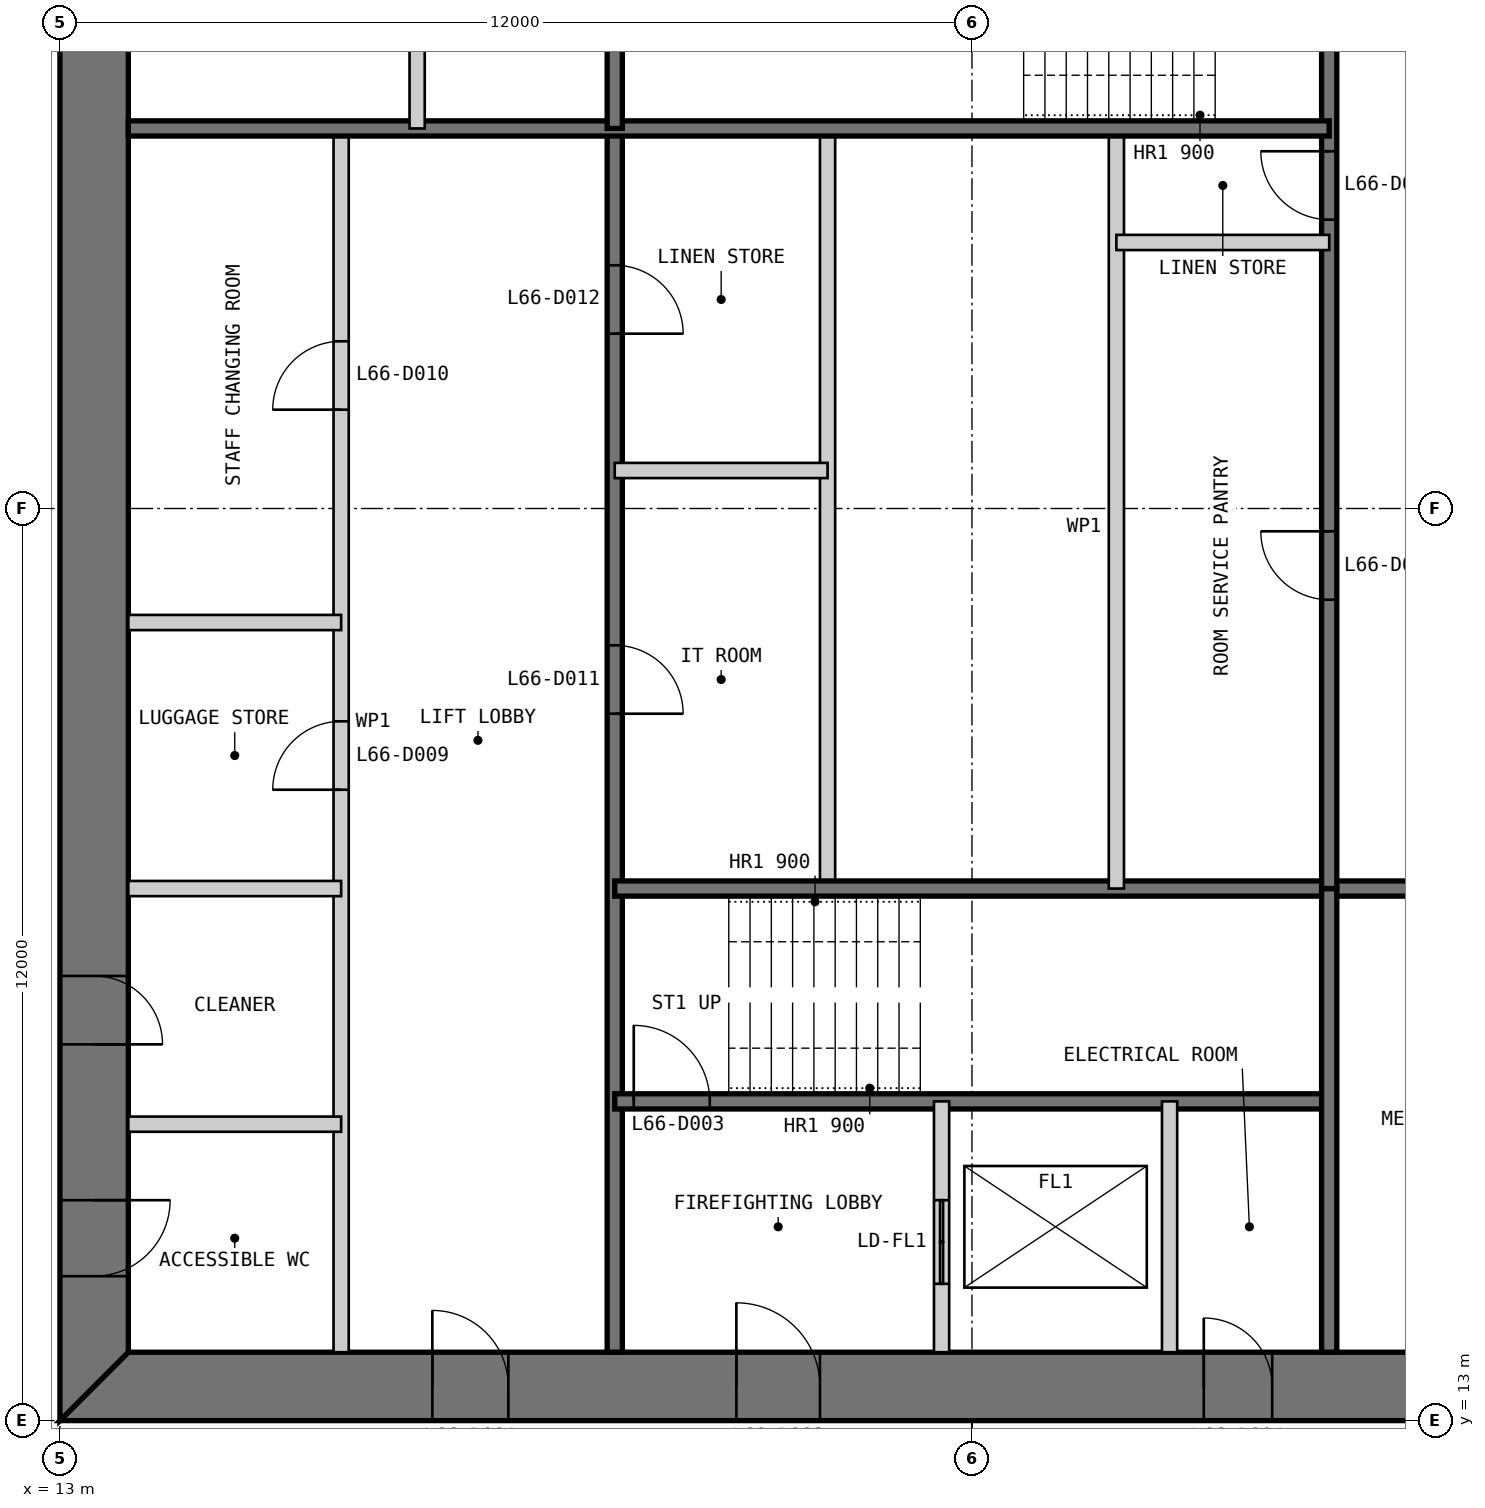
"""IFC4 building model, lengths in metres.
Left out: names, types, materials, properties, quantities, classifications, styles, units other than length and angle.
Written with IfcOpenShell. Run it as: python <this file> out.ifc"""

import sys

from ifc_helpers import new_model, si_unit, direction, frame, frame_2d, origin, place, context, subcontext, project, spatial, polyline, rectangle, outline, extrude, element, fill, save


model = new_model("IFC4")
c1 = context("Model", 3, precision=1e-05, world=origin(), true_north=direction((0.0, 1.0)))
c2 = subcontext(c1, "Body", "Model", "MODEL_VIEW")
j1 = project(units=[si_unit("LENGTHUNIT", "METRE"), si_unit("PLANEANGLEUNIT", "RADIAN")], contexts=[c1])
p1 = place(None, origin())
s1 = spatial("IfcSite", under=j1, at=p1, CompositionType="ELEMENT")
p2 = place(p1, origin())
s2 = spatial("IfcBuilding", under=s1, at=p2, CompositionType="ELEMENT")
p3 = place(p2, frame((0.0, 0.0, 276.4)))
s3 = spatial("IfcBuildingStorey", under=s2, at=p3, CompositionType="ELEMENT", Elevation=276.4)
p4 = place(p3, frame((13.0, 13.45, 0.0), z_axis=(0.0, 0.0, 1.0), x_axis=(1.0, 0.0, 0.0)))
e1 = element("IfcWall", 1, at=p4, inside=s3, PredefinedType="SHEAR", context=c2, shape_type="SweptSolid", body=[
    extrude(outline(polyline([(0.0, -0.45), (24.0, -0.45), (23.1, 0.45), (0.9, 0.45), (0.0, -0.45)])), origin(), (0.0, 0.0, 1.0), 3.4),
])
p5 = place(p4, frame((4.9, 0.0, 0.0)))
e2 = element("IfcOpeningElement", 2, at=p5, cuts=e1, PredefinedType="OPENING", context=c2, shape_type="SweptSolid", body=[
    extrude(rectangle(XDim=1.0, YDim=2.2, at=frame_2d((0.5, 1.1))), frame((0.0, 0.46, 0.0), z_axis=(0.0, -1.0, 0.0), x_axis=(1.0, 0.0, 0.0)), (0.0, 0.0, 1.0), 0.92),
])
p6 = place(p4, frame((8.9, 0.0, 0.0)))
e3 = element("IfcOpeningElement", 3, at=p6, cuts=e1, PredefinedType="OPENING", context=c2, shape_type="SweptSolid", body=[
    extrude(rectangle(XDim=1.1, YDim=2.2, at=frame_2d((0.55, 1.1))), frame((0.0, 0.46, 0.0), z_axis=(0.0, -1.0, 0.0), x_axis=(1.0, 0.0, 0.0)), (0.0, 0.0, 1.0), 0.92),
])
p7 = place(p4, frame((15.05, 0.0, 0.0)))
e4 = element("IfcOpeningElement", 4, at=p7, cuts=e1, PredefinedType="OPENING", context=c2, shape_type="SweptSolid", body=[
    extrude(rectangle(XDim=0.9, YDim=2.2, at=frame_2d((0.45, 1.1))), frame((0.0, 0.46, 0.0), z_axis=(0.0, -1.0, 0.0), x_axis=(1.0, 0.0, 0.0)), (0.0, 0.0, 1.0), 0.92),
])
p8 = place(p4, frame((17.9, 0.0, 0.0)))
e5 = element("IfcOpeningElement", 5, at=p8, cuts=e1, PredefinedType="OPENING", context=c2, shape_type="SweptSolid", body=[
    extrude(rectangle(XDim=1.0, YDim=2.2, at=frame_2d((0.5, 1.1))), frame((0.0, 0.46, 0.0), z_axis=(0.0, -1.0, 0.0), x_axis=(1.0, 0.0, 0.0)), (0.0, 0.0, 1.0), 0.92),
])
p9 = place(p4, frame((21.4, 0.0, 0.0)))
e6 = element("IfcOpeningElement", 6, at=p9, cuts=e1, PredefinedType="OPENING", context=c2, shape_type="SweptSolid", body=[
    extrude(rectangle(XDim=1.0, YDim=2.2, at=frame_2d((0.5, 1.1))), frame((0.0, 0.46, 0.0), z_axis=(0.0, -1.0, 0.0), x_axis=(1.0, 0.0, 0.0)), (0.0, 0.0, 1.0), 0.92),
])
p10 = place(p3, frame((13.45, 36.1, 0.0), z_axis=(0.0, 0.0, 1.0), x_axis=(0.0, -1.0, 0.0)))
e7 = element("IfcWall", 7, at=p10, inside=s3, PredefinedType="SHEAR", context=c2, shape_type="SweptSolid", body=[
    extrude(outline(polyline([(-0.9, -0.45), (23.1, -0.45), (22.2, 0.45), (0.0, 0.45), (-0.9, -0.45)])), origin(), (0.0, 0.0, 1.0), 3.4),
])
p11 = place(p10, frame((20.2, 0.0, 0.0)))
e8 = element("IfcOpeningElement", 8, at=p11, cuts=e7, PredefinedType="OPENING", context=c2, shape_type="SweptSolid", body=[
    extrude(rectangle(XDim=1.0, YDim=2.2, at=frame_2d((0.5, 1.1))), frame((0.0, 0.46, 0.0), z_axis=(0.0, -1.0, 0.0), x_axis=(1.0, 0.0, 0.0)), (0.0, 0.0, 1.0), 0.92),
])
p12 = place(p10, frame((17.25, 0.0, 0.0)))
e9 = element("IfcOpeningElement", 9, at=p12, cuts=e7, PredefinedType="OPENING", context=c2, shape_type="SweptSolid", body=[
    extrude(rectangle(XDim=0.9, YDim=2.2, at=frame_2d((0.45, 1.1))), frame((0.0, 0.46, 0.0), z_axis=(0.0, -1.0, 0.0), x_axis=(1.0, 0.0, 0.0)), (0.0, 0.0, 1.0), 0.92),
])
p13 = place(p3, frame((16.7, 13.9, 0.0), z_axis=(0.0, 0.0, 1.0), x_axis=(0.0, 1.0, 0.0)))
e10 = element("IfcWall", 10, at=p13, inside=s3, PredefinedType="PARTITIONING", context=c2, shape_type="SweptSolid", body=[
    extrude(rectangle(XDim=16.1, YDim=0.2, at=frame_2d((8.05, 0.0))), origin(), (0.0, 0.0, 1.0), 3.2),
])
p14 = place(p13, frame((7.4, 0.0, 0.0)))
e11 = element("IfcOpeningElement", 11, at=p14, cuts=e10, PredefinedType="OPENING", context=c2, shape_type="SweptSolid", body=[
    extrude(rectangle(XDim=0.9, YDim=2.2, at=frame_2d((0.45, 1.1))), frame((0.0, 0.11, 0.0), z_axis=(0.0, -1.0, 0.0), x_axis=(1.0, 0.0, 0.0)), (0.0, 0.0, 1.0), 0.22),
])
p15 = place(p13, frame((12.4, 0.0, 0.0)))
e12 = element("IfcOpeningElement", 12, at=p15, cuts=e10, PredefinedType="OPENING", context=c2, shape_type="SweptSolid", body=[
    extrude(rectangle(XDim=0.9, YDim=2.2, at=frame_2d((0.45, 1.1))), frame((0.0, 0.11, 0.0), z_axis=(0.0, -1.0, 0.0), x_axis=(1.0, 0.0, 0.0)), (0.0, 0.0, 1.0), 0.22),
])
p16 = place(p3, frame((20.3, 13.9, 0.0), z_axis=(0.0, 0.0, 1.0), x_axis=(0.0, 1.0, 0.0)))
e13 = element("IfcWall", 13, at=p16, inside=s3, PredefinedType="SOLIDWALL", context=c2, shape_type="SweptSolid", body=[
    extrude(rectangle(XDim=16.1, YDim=0.2, at=frame_2d((8.05, 0.0))), origin(), (0.0, 0.0, 1.0), 3.2),
])
p17 = place(p16, frame((8.4, 0.0, 0.0)))
e14 = element("IfcOpeningElement", 14, at=p17, cuts=e13, PredefinedType="OPENING", context=c2, shape_type="SweptSolid", body=[
    extrude(rectangle(XDim=0.9, YDim=2.2, at=frame_2d((0.45, 1.1))), frame((0.0, 0.11, 0.0), z_axis=(0.0, -1.0, 0.0), x_axis=(1.0, 0.0, 0.0)), (0.0, 0.0, 1.0), 0.22),
])
p18 = place(p16, frame((13.4, 0.0, 0.0)))
e15 = element("IfcOpeningElement", 15, at=p18, cuts=e13, PredefinedType="OPENING", context=c2, shape_type="SweptSolid", body=[
    extrude(rectangle(XDim=0.9, YDim=2.2, at=frame_2d((0.45, 1.1))), frame((0.0, 0.11, 0.0), z_axis=(0.0, -1.0, 0.0), x_axis=(1.0, 0.0, 0.0)), (0.0, 0.0, 1.0), 0.22),
])
p19 = place(p3, frame((23.1, 20.0, 0.0), z_axis=(0.0, 0.0, 1.0), x_axis=(0.0, 1.0, 0.0)))
e16 = element("IfcWall", 16, at=p19, inside=s3, PredefinedType="PARTITIONING", context=c2, shape_type="SweptSolid", body=[
    extrude(rectangle(XDim=10.0, YDim=0.2, at=frame_2d((5.0, 0.0))), origin(), (0.0, 0.0, 1.0), 3.2),
])
p20 = place(p3, frame((20.3, 17.2, 0.0), z_axis=(0.0, 0.0, 1.0), x_axis=(1.0, 0.0, 0.0)))
e17 = element("IfcWall", 17, at=p20, inside=s3, PredefinedType="SOLIDWALL", context=c2, shape_type="SweptSolid", body=[
    extrude(rectangle(XDim=9.4, YDim=0.2, at=frame_2d((4.7, 0.0))), origin(), (0.0, 0.0, 1.0), 3.2),
])
p21 = place(p20, frame((0.25, 0.0, 0.0)))
e18 = element("IfcOpeningElement", 18, at=p21, cuts=e17, PredefinedType="OPENING", context=c2, shape_type="SweptSolid", body=[
    extrude(rectangle(XDim=1.0, YDim=2.2, at=frame_2d((0.5, 1.1))), frame((0.0, 0.11, 0.0), z_axis=(0.0, -1.0, 0.0), x_axis=(1.0, 0.0, 0.0)), (0.0, 0.0, 1.0), 0.22),
])
p22 = place(p3, frame((20.3, 20.0, 0.0), z_axis=(0.0, 0.0, 1.0), x_axis=(1.0, 0.0, 0.0)))
e19 = element("IfcWall", 19, at=p22, inside=s3, PredefinedType="SOLIDWALL", context=c2, shape_type="SweptSolid", body=[
    extrude(rectangle(XDim=15.8, YDim=0.2, at=frame_2d((7.9, 0.0))), origin(), (0.0, 0.0, 1.0), 3.2),
])
p23 = place(p3, frame((24.6, 13.9, 0.0), z_axis=(0.0, 0.0, 1.0), x_axis=(0.0, 1.0, 0.0)))
e20 = element("IfcWall", 20, at=p23, inside=s3, PredefinedType="PARTITIONING", context=c2, shape_type="SweptSolid", body=[
    extrude(rectangle(XDim=3.3, YDim=0.2, at=frame_2d((1.65, 0.0))), origin(), (0.0, 0.0, 1.0), 3.2),
])
p24 = place(p23, frame((0.9, 0.0, 0.0)))
e21 = element("IfcOpeningElement", 21, at=p24, cuts=e20, PredefinedType="OPENING", context=c2, shape_type="SweptSolid", body=[
    extrude(rectangle(XDim=1.1, YDim=2.2, at=frame_2d((0.55, 1.1))), frame((0.0, 0.11, 0.0), z_axis=(0.0, -1.0, 0.0), x_axis=(1.0, 0.0, 0.0)), (0.0, 0.0, 1.0), 0.22),
])
p25 = place(p3, frame((27.6, 13.9, 0.0), z_axis=(0.0, 0.0, 1.0), x_axis=(0.0, 1.0, 0.0)))
e22 = element("IfcWall", 22, at=p25, inside=s3, PredefinedType="PARTITIONING", context=c2, shape_type="SweptSolid", body=[
    extrude(rectangle(XDim=3.3, YDim=0.2, at=frame_2d((1.65, 0.0))), origin(), (0.0, 0.0, 1.0), 3.2),
])
p26 = place(p3, frame((29.7, 13.9, 0.0), z_axis=(0.0, 0.0, 1.0), x_axis=(0.0, 1.0, 0.0)))
e23 = element("IfcWall", 23, at=p26, inside=s3, PredefinedType="SOLIDWALL", context=c2, shape_type="SweptSolid", body=[
    extrude(rectangle(XDim=6.1, YDim=0.2, at=frame_2d((3.05, 0.0))), origin(), (0.0, 0.0, 1.0), 3.2),
])
for number, where, z_axis, x_axis in (
    (24, (13.9, 16.9, 0.0), (0.0, 0.0, 1.0), (1.0, 0.0, 0.0)),
    (25, (13.9, 20.0, 0.0), (0.0, 0.0, 1.0), (1.0, 0.0, 0.0)),
    (26, (13.9, 23.5, 0.0), (0.0, 0.0, 1.0), (1.0, 0.0, 0.0)),
    (27, (20.3, 25.5, 0.0), (0.0, 0.0, 1.0), (1.0, 0.0, 0.0)),
):
    element("IfcWall", number, at=place(p3, frame(where, z_axis=z_axis, x_axis=x_axis)), inside=s3, PredefinedType="PARTITIONING", context=c2, shape_type="SweptSolid", body=[
        extrude(rectangle(XDim=2.8, YDim=0.2, at=frame_2d((1.4, 0.0))), origin(), (0.0, 0.0, 1.0), 3.2),
    ])
p27 = place(p3, frame((29.7, 36.1, 0.0), z_axis=(0.0, 0.0, 1.0), x_axis=(0.0, -1.0, 0.0)))
e28 = element("IfcWall", 28, at=p27, inside=s3, PredefinedType="SOLIDWALL", context=c2, shape_type="SweptSolid", body=[
    extrude(rectangle(XDim=16.1, YDim=0.2, at=frame_2d((8.05, 0.0))), origin(), (0.0, 0.0, 1.0), 3.2),
])
p28 = place(p27, frame((6.4, 0.0, 0.0)))
e29 = element("IfcOpeningElement", 29, at=p28, cuts=e28, PredefinedType="OPENING", context=c2, shape_type="SweptSolid", body=[
    extrude(rectangle(XDim=0.9, YDim=2.2, at=frame_2d((0.45, 1.1))), frame((0.0, 0.11, 0.0), z_axis=(0.0, -1.0, 0.0), x_axis=(1.0, 0.0, 0.0)), (0.0, 0.0, 1.0), 0.22),
])
p29 = place(p27, frame((11.4, 0.0, 0.0)))
e30 = element("IfcOpeningElement", 30, at=p29, cuts=e28, PredefinedType="OPENING", context=c2, shape_type="SweptSolid", body=[
    extrude(rectangle(XDim=0.9, YDim=2.2, at=frame_2d((0.45, 1.1))), frame((0.0, 0.11, 0.0), z_axis=(0.0, -1.0, 0.0), x_axis=(1.0, 0.0, 0.0)), (0.0, 0.0, 1.0), 0.22),
])
p30 = place(p3, frame((26.9, 30.0, 0.0), z_axis=(0.0, 0.0, 1.0), x_axis=(0.0, -1.0, 0.0)))
e31 = element("IfcWall", 31, at=p30, inside=s3, PredefinedType="PARTITIONING", context=c2, shape_type="SweptSolid", body=[
    extrude(rectangle(XDim=10.0, YDim=0.2, at=frame_2d((5.0, 0.0))), origin(), (0.0, 0.0, 1.0), 3.2),
])
p31 = place(p3, frame((29.7, 30.0, 0.0), z_axis=(0.0, 0.0, 1.0), x_axis=(-1.0, 0.0, 0.0)))
e32 = element("IfcWall", 32, at=p31, inside=s3, PredefinedType="SOLIDWALL", context=c2, shape_type="SweptSolid", body=[
    extrude(rectangle(XDim=15.8, YDim=0.2, at=frame_2d((7.9, 0.0))), origin(), (0.0, 0.0, 1.0), 3.2),
])
p32 = place(p3, frame((20.3, 36.1, 0.0), z_axis=(0.0, 0.0, 1.0), x_axis=(0.0, -1.0, 0.0)))
e33 = element("IfcWall", 33, at=p32, inside=s3, PredefinedType="SOLIDWALL", context=c2, shape_type="SweptSolid", body=[
    extrude(rectangle(XDim=6.1, YDim=0.2, at=frame_2d((3.05, 0.0))), origin(), (0.0, 0.0, 1.0), 3.2),
])
p33 = place(p3, frame((17.7, 36.1, 0.0), z_axis=(0.0, 0.0, 1.0), x_axis=(0.0, -1.0, 0.0)))
e34 = element("IfcWall", 34, at=p33, inside=s3, PredefinedType="PARTITIONING", context=c2, shape_type="SweptSolid", body=[
    extrude(rectangle(XDim=6.1, YDim=0.2, at=frame_2d((3.05, 0.0))), origin(), (0.0, 0.0, 1.0), 3.2),
])
p34 = place(p3, frame((29.7, 28.5, 0.0), z_axis=(0.0, 0.0, 1.0), x_axis=(-1.0, 0.0, 0.0)))
e35 = element("IfcWall", 35, at=p34, inside=s3, PredefinedType="PARTITIONING", context=c2, shape_type="SweptSolid", body=[
    extrude(rectangle(XDim=2.8, YDim=0.2, at=frame_2d((1.4, 0.0))), origin(), (0.0, 0.0, 1.0), 3.2),
])
p35 = place(p5, origin())
e36 = element("IfcDoor", 36, at=p35, inside=s3, OperationType="SINGLE_SWING_LEFT", PredefinedType="DOOR", context=c2, shape_type="SweptSolid", body=[
    extrude(rectangle(XDim=1.0, YDim=2.2, at=frame_2d((0.5, 1.1))), frame((0.0, 0.025, 0.0), z_axis=(0.0, -1.0, 0.0), x_axis=(1.0, 0.0, 0.0)), (0.0, 0.0, 1.0), 0.05),
    extrude(outline(polyline([(0.0, 0.0), (0.04, 0.0), (0.04, 2.16), (0.96, 2.16), (0.96, 0.0), (1.0, 0.0), (1.0, 2.2), (0.0, 2.2), (0.0, 0.0)])), frame((0.0, 0.3, 0.0), z_axis=(0.0, -1.0, 0.0), x_axis=(1.0, 0.0, 0.0)), (0.0, 0.0, 1.0), 0.6),
])
fill(e2, e36)
p36 = place(p6, origin())
e37 = element("IfcDoor", 37, at=p36, inside=s3, OperationType="SINGLE_SWING_LEFT", PredefinedType="DOOR", context=c2, shape_type="SweptSolid", body=[
    extrude(rectangle(XDim=1.1, YDim=2.2, at=frame_2d((0.55, 1.1))), frame((0.0, 0.025, 0.0), z_axis=(0.0, -1.0, 0.0), x_axis=(1.0, 0.0, 0.0)), (0.0, 0.0, 1.0), 0.05),
    extrude(outline(polyline([(0.0, 0.0), (0.04, 0.0), (0.04, 2.16), (1.06, 2.16), (1.06, 0.0), (1.1, 0.0), (1.1, 2.2), (0.0, 2.2), (0.0, 0.0)])), frame((0.0, 0.3, 0.0), z_axis=(0.0, -1.0, 0.0), x_axis=(1.0, 0.0, 0.0)), (0.0, 0.0, 1.0), 0.6),
])
fill(e3, e37)
p37 = place(p21, origin())
e38 = element("IfcDoor", 38, at=p37, inside=s3, OperationType="SINGLE_SWING_LEFT", PredefinedType="DOOR", context=c2, shape_type="SweptSolid", body=[
    extrude(rectangle(XDim=1.0, YDim=2.2, at=frame_2d((0.5, 1.1))), frame((0.0, 0.025, 0.0), z_axis=(0.0, -1.0, 0.0), x_axis=(1.0, 0.0, 0.0)), (0.0, 0.0, 1.0), 0.05),
])
fill(e18, e38)
p38 = place(p7, origin())
e39 = element("IfcDoor", 39, at=p38, inside=s3, OperationType="SINGLE_SWING_LEFT", PredefinedType="DOOR", context=c2, shape_type="SweptSolid", body=[
    extrude(rectangle(XDim=0.9, YDim=2.2, at=frame_2d((0.45, 1.1))), frame((0.0, 0.025, 0.0), z_axis=(0.0, -1.0, 0.0), x_axis=(1.0, 0.0, 0.0)), (0.0, 0.0, 1.0), 0.05),
    extrude(outline(polyline([(0.0, 0.0), (0.04, 0.0), (0.04, 2.16), (0.86, 2.16), (0.86, 0.0), (0.9, 0.0), (0.9, 2.2), (0.0, 2.2), (0.0, 0.0)])), frame((0.0, 0.3, 0.0), z_axis=(0.0, -1.0, 0.0), x_axis=(1.0, 0.0, 0.0)), (0.0, 0.0, 1.0), 0.6),
])
fill(e4, e39)
p39 = place(p11, origin())
e40 = element("IfcDoor", 40, at=p39, inside=s3, OperationType="SINGLE_SWING_LEFT", PredefinedType="DOOR", context=c2, shape_type="SweptSolid", body=[
    extrude(rectangle(XDim=1.0, YDim=2.2, at=frame_2d((0.5, 1.1))), frame((0.0, 0.025, 0.0), z_axis=(0.0, -1.0, 0.0), x_axis=(1.0, 0.0, 0.0)), (0.0, 0.0, 1.0), 0.05),
    extrude(outline(polyline([(0.0, 0.0), (0.04, 0.0), (0.04, 2.16), (0.96, 2.16), (0.96, 0.0), (1.0, 0.0), (1.0, 2.2), (0.0, 2.2), (0.0, 0.0)])), frame((0.0, 0.3, 0.0), z_axis=(0.0, -1.0, 0.0), x_axis=(1.0, 0.0, 0.0)), (0.0, 0.0, 1.0), 0.6),
])
fill(e8, e40)
p40 = place(p12, origin())
e41 = element("IfcDoor", 41, at=p40, inside=s3, OperationType="SINGLE_SWING_RIGHT", PredefinedType="DOOR", context=c2, shape_type="SweptSolid", body=[
    extrude(rectangle(XDim=0.9, YDim=2.2, at=frame_2d((0.45, 1.1))), frame((0.0, 0.025, 0.0), z_axis=(0.0, -1.0, 0.0), x_axis=(1.0, 0.0, 0.0)), (0.0, 0.0, 1.0), 0.05),
    extrude(outline(polyline([(0.0, 0.0), (0.04, 0.0), (0.04, 2.16), (0.86, 2.16), (0.86, 0.0), (0.9, 0.0), (0.9, 2.2), (0.0, 2.2), (0.0, 0.0)])), frame((0.0, 0.3, 0.0), z_axis=(0.0, -1.0, 0.0), x_axis=(1.0, 0.0, 0.0)), (0.0, 0.0, 1.0), 0.6),
])
fill(e9, e41)
p41 = place(p14, origin())
e42 = element("IfcDoor", 42, at=p41, inside=s3, OperationType="SINGLE_SWING_LEFT", PredefinedType="DOOR", context=c2, shape_type="SweptSolid", body=[
    extrude(rectangle(XDim=0.9, YDim=2.2, at=frame_2d((0.45, 1.1))), frame((0.0, 0.025, 0.0), z_axis=(0.0, -1.0, 0.0), x_axis=(1.0, 0.0, 0.0)), (0.0, 0.0, 1.0), 0.05),
])
fill(e11, e42)
p42 = place(p15, origin())
e43 = element("IfcDoor", 43, at=p42, inside=s3, OperationType="SINGLE_SWING_LEFT", PredefinedType="DOOR", context=c2, shape_type="SweptSolid", body=[
    extrude(rectangle(XDim=0.9, YDim=2.2, at=frame_2d((0.45, 1.1))), frame((0.0, 0.025, 0.0), z_axis=(0.0, -1.0, 0.0), x_axis=(1.0, 0.0, 0.0)), (0.0, 0.0, 1.0), 0.05),
])
fill(e12, e43)
p43 = place(p17, frame((0.9, 0.0, 0.0), z_axis=(0.0, 0.0, 1.0), x_axis=(-1.0, 0.0, 0.0)))
e44 = element("IfcDoor", 44, at=p43, inside=s3, OperationType="SINGLE_SWING_RIGHT", PredefinedType="DOOR", context=c2, shape_type="SweptSolid", body=[
    extrude(rectangle(XDim=0.9, YDim=2.2, at=frame_2d((0.45, 1.1))), frame((0.0, 0.025, 0.0), z_axis=(0.0, -1.0, 0.0), x_axis=(1.0, 0.0, 0.0)), (0.0, 0.0, 1.0), 0.05),
])
fill(e14, e44)
p44 = place(p18, frame((0.9, 0.0, 0.0), z_axis=(0.0, 0.0, 1.0), x_axis=(-1.0, 0.0, 0.0)))
e45 = element("IfcDoor", 45, at=p44, inside=s3, OperationType="SINGLE_SWING_RIGHT", PredefinedType="DOOR", context=c2, shape_type="SweptSolid", body=[
    extrude(rectangle(XDim=0.9, YDim=2.2, at=frame_2d((0.45, 1.1))), frame((0.0, 0.025, 0.0), z_axis=(0.0, -1.0, 0.0), x_axis=(1.0, 0.0, 0.0)), (0.0, 0.0, 1.0), 0.05),
])
fill(e15, e45)
p45 = place(p28, frame((0.9, 0.0, 0.0), z_axis=(0.0, 0.0, 1.0), x_axis=(-1.0, 0.0, 0.0)))
e46 = element("IfcDoor", 46, at=p45, inside=s3, OperationType="SINGLE_SWING_RIGHT", PredefinedType="DOOR", context=c2, shape_type="SweptSolid", body=[
    extrude(rectangle(XDim=0.9, YDim=2.2, at=frame_2d((0.45, 1.1))), frame((0.0, 0.025, 0.0), z_axis=(0.0, -1.0, 0.0), x_axis=(1.0, 0.0, 0.0)), (0.0, 0.0, 1.0), 0.05),
])
fill(e29, e46)
p46 = place(p29, frame((0.9, 0.0, 0.0), z_axis=(0.0, 0.0, 1.0), x_axis=(-1.0, 0.0, 0.0)))
e47 = element("IfcDoor", 47, at=p46, inside=s3, OperationType="SINGLE_SWING_RIGHT", PredefinedType="DOOR", context=c2, shape_type="SweptSolid", body=[
    extrude(rectangle(XDim=0.9, YDim=2.2, at=frame_2d((0.45, 1.1))), frame((0.0, 0.025, 0.0), z_axis=(0.0, -1.0, 0.0), x_axis=(1.0, 0.0, 0.0)), (0.0, 0.0, 1.0), 0.05),
])
fill(e30, e47)
p47 = place(p24, origin())
e48 = element("IfcDoor", 48, at=p47, inside=s3, OperationType="DOUBLE_DOOR_SLIDING", PredefinedType="DOOR", context=c2, shape_type="SweptSolid", body=[
    extrude(rectangle(XDim=1.1, YDim=2.2, at=frame_2d((0.55, 1.1))), frame((0.0, 0.025, 0.0), z_axis=(0.0, -1.0, 0.0), x_axis=(1.0, 0.0, 0.0)), (0.0, 0.0, 1.0), 0.05),
])
fill(e21, e48)
save(model, sys.argv[1])
